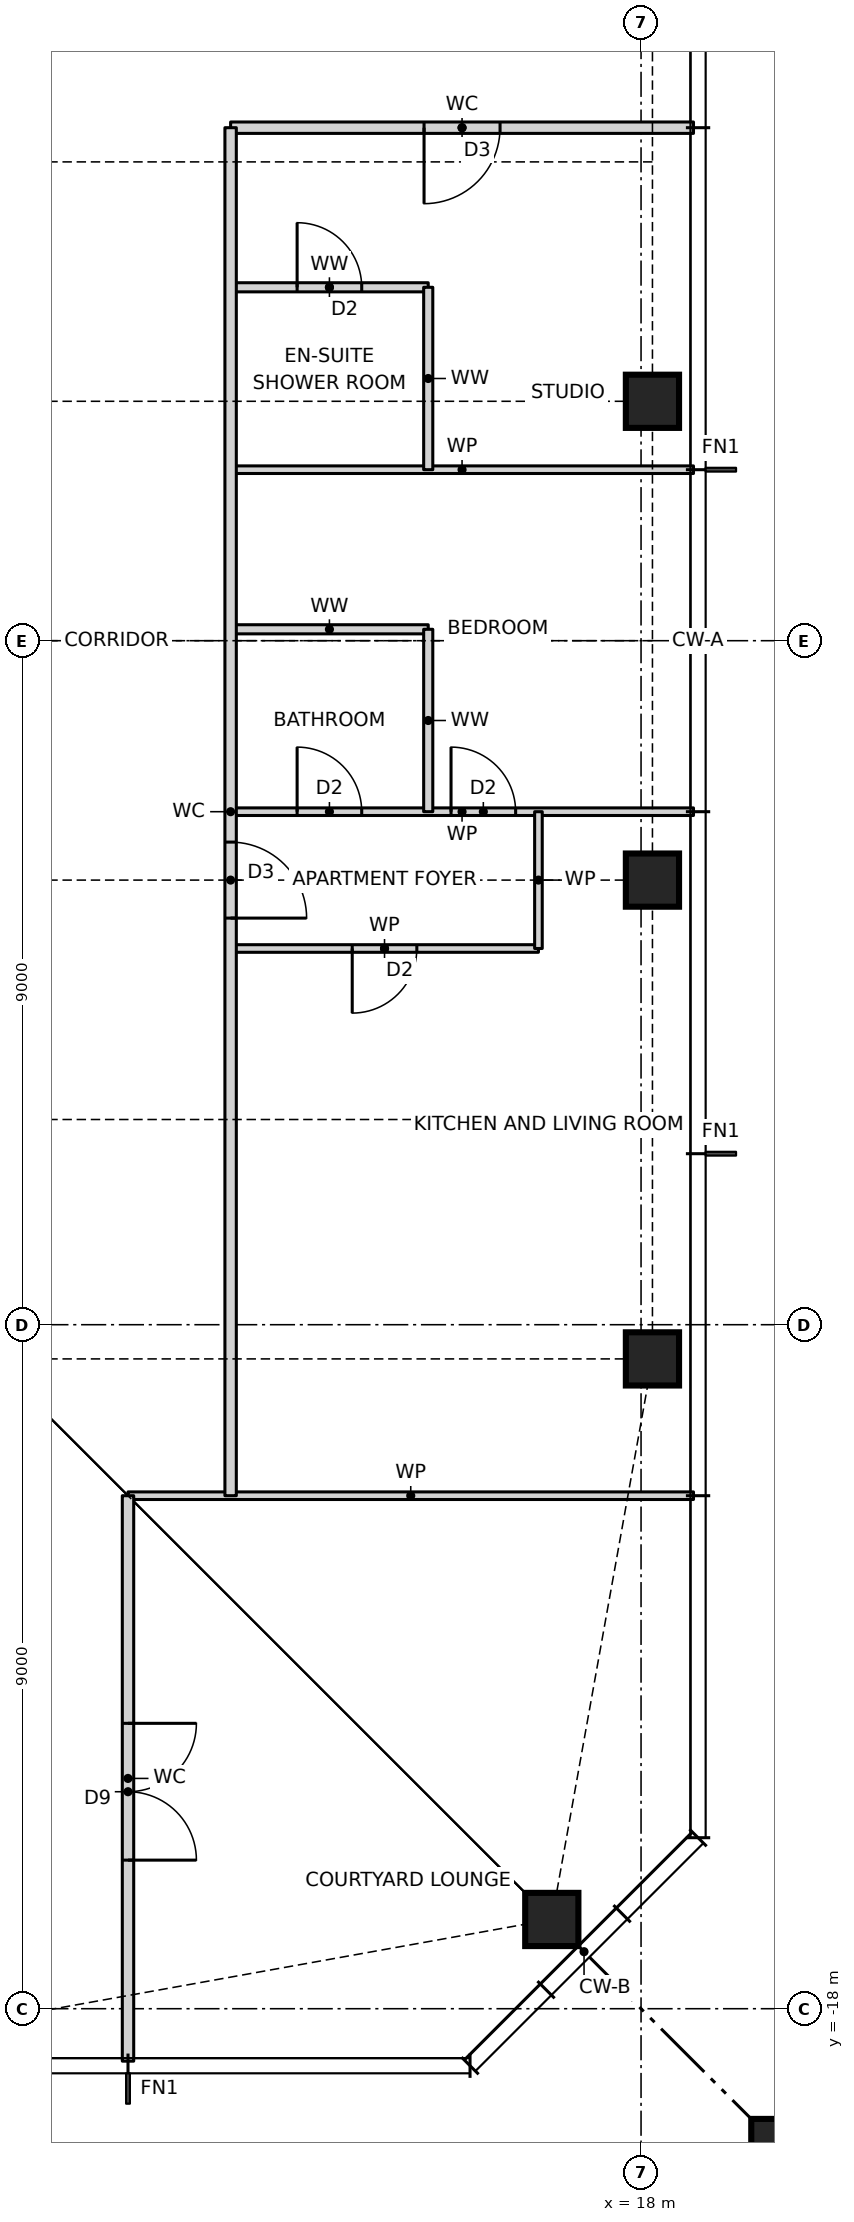
"""IFC4 building model, lengths in metres.
Left out: names, types, materials, properties, quantities, classifications, styles, units other than length and angle.
Written with IfcOpenShell. Run it as: python <this file> out.ifc"""

import sys

from ifc_helpers import new_model, si_unit, direction, frame, frame_2d, origin, origin_2d, place, context, subcontext, project, spatial, rectangle, hollow_rectangle, i_section, extrude, element, fill, save


model = new_model("IFC4")
c1 = context("Model", 3, precision=1e-05, world=origin(), true_north=direction((0.0, 1.0)))
c2 = subcontext(c1, "Body", "Model", "MODEL_VIEW")
j1 = project(units=[si_unit("LENGTHUNIT", "METRE"), si_unit("PLANEANGLEUNIT", "RADIAN")], contexts=[c1])
p1 = place(None, origin())
s1 = spatial("IfcSite", under=j1, at=p1, CompositionType="ELEMENT")
p2 = place(p1, origin())
s2 = spatial("IfcBuilding", under=s1, at=p2, CompositionType="ELEMENT")
p3 = place(p2, frame((0.0, 0.0, 170.5)))
s3 = spatial("IfcBuildingStorey", under=s2, at=p3, CompositionType="ELEMENT", Elevation=170.5)
for number, where, z_axis, x_axis in (
    (1, (16.826, -16.826, 0.0), (0.0, 0.0, 1.0), (1.0, 0.0, 0.0)),
    (2, (18.15, -9.45, 0.0), (0.0, 0.0, 1.0), (1.0, 0.0, 0.0)),
    (3, (18.15, -3.15, 0.0), (0.0, 0.0, 1.0), (1.0, 0.0, 0.0)),
    (4, (18.15, 3.15, 0.0), (0.0, 0.0, 1.0), (1.0, 0.0, 0.0)),
):
    element("IfcColumn", number, at=place(p3, frame(where, z_axis=z_axis, x_axis=x_axis)), inside=s3, PredefinedType="COLUMN", context=c2, shape_type="SweptSolid", body=[
        extrude(hollow_rectangle(XDim=0.7, YDim=0.7, WallThickness=0.06, at=origin_2d()), origin(), (0.0, 0.0, 1.0), 3.5),
    ])
p4 = place(p3, frame((21.65, -21.65, 0.0), z_axis=(0.0, 0.0, 1.0), x_axis=(1.0, 0.0, 0.0)))
e5 = element("IfcColumn", 5, at=p4, inside=s3, PredefinedType="COLUMN", context=c2, shape_type="SweptSolid", body=[
    extrude(rectangle(XDim=4.4, YDim=4.4, at=origin_2d()), origin(), (0.0, 0.0, 1.0), 3.5),
    extrude(i_section(OverallWidth=0.478, OverallDepth=0.599, WebThickness=0.1, FlangeThickness=0.14, at=origin_2d()), origin(), (0.0, 0.0, 1.0), 3.5),
])
p5 = place(p3, frame((11.25, -11.25, 0.0), z_axis=(0.0, 0.0, 1.0), x_axis=(1.0, 0.0, 0.0)))
e6 = element("IfcWall", 6, at=p5, inside=s3, PredefinedType="PARTITIONING", context=c2, shape_type="SweptSolid", body=[
    extrude(rectangle(XDim=7.44, YDim=0.1, at=frame_2d((3.72, 0.0))), origin(), (0.0, 0.0, 1.0), 3.27),
])
p6 = place(p3, frame((12.6, -4.05, 0.0), z_axis=(0.0, 0.0, 1.0), x_axis=(1.0, 0.0, 0.0)))
e7 = element("IfcWall", 7, at=p6, inside=s3, PredefinedType="PARTITIONING", context=c2, shape_type="SweptSolid", body=[
    extrude(rectangle(XDim=4.05, YDim=0.1, at=frame_2d((2.025, 0.0))), origin(), (0.0, 0.0, 1.0), 3.27),
])
p7 = place(p6, frame((1.6, 0.0, 0.0)))
e8 = element("IfcOpeningElement", 8, at=p7, cuts=e7, PredefinedType="OPENING", context=c2, shape_type="SweptSolid", body=[
    extrude(rectangle(XDim=0.85, YDim=2.1, at=frame_2d((0.425, 1.05))), frame((0.0, 0.06, 0.0), z_axis=(0.0, -1.0, 0.0), x_axis=(1.0, 0.0, 0.0)), (0.0, 0.0, 1.0), 0.12),
])
p8 = place(p3, frame((12.6, -2.25, 0.0), z_axis=(0.0, 0.0, 1.0), x_axis=(1.0, 0.0, 0.0)))
e9 = element("IfcWall", 9, at=p8, inside=s3, PredefinedType="PARTITIONING", context=c2, shape_type="SweptSolid", body=[
    extrude(rectangle(XDim=6.09, YDim=0.1, at=frame_2d((3.045, 0.0))), origin(), (0.0, 0.0, 1.0), 3.27),
])
p9 = place(p8, frame((2.9, 0.0, 0.0)))
e10 = element("IfcOpeningElement", 10, at=p9, cuts=e9, PredefinedType="OPENING", context=c2, shape_type="SweptSolid", body=[
    extrude(rectangle(XDim=0.85, YDim=2.1, at=frame_2d((0.425, 1.05))), frame((0.0, 0.06, 0.0), z_axis=(0.0, -1.0, 0.0), x_axis=(1.0, 0.0, 0.0)), (0.0, 0.0, 1.0), 0.12),
])
p10 = place(p8, frame((0.875, 0.0, 0.0)))
e11 = element("IfcOpeningElement", 11, at=p10, cuts=e9, PredefinedType="OPENING", context=c2, shape_type="SweptSolid", body=[
    extrude(rectangle(XDim=0.85, YDim=2.1, at=frame_2d((0.425, 1.05))), frame((0.0, 0.06, 0.0), z_axis=(0.0, -1.0, 0.0), x_axis=(1.0, 0.0, 0.0)), (0.0, 0.0, 1.0), 0.12),
])
p11 = place(p3, frame((12.6, 0.15, 0.0), z_axis=(0.0, 0.0, 1.0), x_axis=(1.0, 0.0, 0.0)))
e12 = element("IfcWall", 12, at=p11, inside=s3, PredefinedType="PARTITIONING", context=c2, shape_type="SweptSolid", body=[
    extrude(rectangle(XDim=2.6, YDim=0.12, at=frame_2d((1.3, 0.0))), origin(), (0.0, 0.0, 1.0), 3.27),
])
p12 = place(p3, frame((12.6, 2.25, 0.0), z_axis=(0.0, 0.0, 1.0), x_axis=(1.0, 0.0, 0.0)))
e13 = element("IfcWall", 13, at=p12, inside=s3, PredefinedType="PARTITIONING", context=c2, shape_type="SweptSolid", body=[
    extrude(rectangle(XDim=6.09, YDim=0.1, at=frame_2d((3.045, 0.0))), origin(), (0.0, 0.0, 1.0), 3.27),
])
p13 = place(p3, frame((12.6, 4.65, 0.0), z_axis=(0.0, 0.0, 1.0), x_axis=(1.0, 0.0, 0.0)))
e14 = element("IfcWall", 14, at=p13, inside=s3, PredefinedType="PARTITIONING", context=c2, shape_type="SweptSolid", body=[
    extrude(rectangle(XDim=2.6, YDim=0.12, at=frame_2d((1.3, 0.0))), origin(), (0.0, 0.0, 1.0), 3.27),
])
p14 = place(p13, frame((0.875, 0.0, 0.0)))
e15 = element("IfcOpeningElement", 15, at=p14, cuts=e14, PredefinedType="OPENING", context=c2, shape_type="SweptSolid", body=[
    extrude(rectangle(XDim=0.85, YDim=2.1, at=frame_2d((0.425, 1.05))), frame((0.0, 0.07, 0.0), z_axis=(0.0, -1.0, 0.0), x_axis=(1.0, 0.0, 0.0)), (0.0, 0.0, 1.0), 0.14),
])
p15 = place(p3, frame((12.6, 6.75, 0.0), z_axis=(0.0, 0.0, 1.0), x_axis=(1.0, 0.0, 0.0)))
e16 = element("IfcWall", 16, at=p15, inside=s3, PredefinedType="PARTITIONING", context=c2, shape_type="SweptSolid", body=[
    extrude(rectangle(XDim=6.09, YDim=0.15, at=frame_2d((3.045, 0.0))), origin(), (0.0, 0.0, 1.0), 3.27),
])
p16 = place(p15, frame((2.545, 0.0, 0.0)))
e17 = element("IfcOpeningElement", 17, at=p16, cuts=e16, PredefinedType="OPENING", context=c2, shape_type="SweptSolid", body=[
    extrude(rectangle(XDim=1.0, YDim=2.1, at=frame_2d((0.5, 1.05))), frame((0.0, 0.085, 0.0), z_axis=(0.0, -1.0, 0.0), x_axis=(1.0, 0.0, 0.0)), (0.0, 0.0, 1.0), 0.17),
])
p17 = place(p3, frame((16.65, -4.05, 0.0), z_axis=(0.0, 0.0, 1.0), x_axis=(0.0, 1.0, 0.0)))
e18 = element("IfcWall", 18, at=p17, inside=s3, PredefinedType="PARTITIONING", context=c2, shape_type="SweptSolid", body=[
    extrude(rectangle(XDim=1.8, YDim=0.1, at=frame_2d((0.9, 0.0))), origin(), (0.0, 0.0, 1.0), 3.27),
])
for number, where, z_axis, x_axis in (
    (19, (15.2, -2.25, 0.0), (0.0, 0.0, 1.0), (0.0, 1.0, 0.0)),
    (20, (15.2, 2.25, 0.0), (0.0, 0.0, 1.0), (0.0, 1.0, 0.0)),
):
    element("IfcWall", number, at=place(p3, frame(where, z_axis=z_axis, x_axis=x_axis)), inside=s3, PredefinedType="PARTITIONING", context=c2, shape_type="SweptSolid", body=[
        extrude(rectangle(XDim=2.4, YDim=0.12, at=frame_2d((1.2, 0.0))), origin(), (0.0, 0.0, 1.0), 3.27),
    ])
p18 = place(p3, frame((12.6, -11.25, 0.0), z_axis=(0.0, 0.0, 1.0), x_axis=(0.0, 1.0, 0.0)))
e21 = element("IfcWall", 21, at=p18, inside=s3, PredefinedType="PARTITIONING", context=c2, shape_type="SweptSolid", body=[
    extrude(rectangle(XDim=18.0, YDim=0.15, at=frame_2d((9.0, 0.0))), origin(), (0.0, 0.0, 1.0), 3.27),
])
p19 = place(p18, frame((7.6, 0.0, 0.0)))
e22 = element("IfcOpeningElement", 22, at=p19, cuts=e21, PredefinedType="OPENING", context=c2, shape_type="SweptSolid", body=[
    extrude(rectangle(XDim=1.0, YDim=2.1, at=frame_2d((0.5, 1.05))), frame((0.0, 0.085, 0.0), z_axis=(0.0, -1.0, 0.0), x_axis=(1.0, 0.0, 0.0)), (0.0, 0.0, 1.0), 0.17),
])
p20 = place(p3, frame((11.25, -18.69, 0.0), z_axis=(0.0, 0.0, 1.0), x_axis=(0.0, 1.0, 0.0)))
e23 = element("IfcWall", 23, at=p20, inside=s3, PredefinedType="PARTITIONING", context=c2, shape_type="SweptSolid", body=[
    extrude(rectangle(XDim=7.44, YDim=0.15, at=frame_2d((3.72, 0.0))), origin(), (0.0, 0.0, 1.0), 3.27),
])
p21 = place(p20, frame((2.645, 0.0, 0.0)))
e24 = element("IfcOpeningElement", 24, at=p21, cuts=e23, PredefinedType="OPENING", context=c2, shape_type="SweptSolid", body=[
    extrude(rectangle(XDim=1.8, YDim=2.1, at=frame_2d((0.9, 1.05))), frame((0.0, 0.085, 0.0), z_axis=(0.0, -1.0, 0.0), x_axis=(1.0, 0.0, 0.0)), (0.0, 0.0, 1.0), 0.17),
])
p22 = place(p19, frame((1.0, 0.0, 0.0), z_axis=(0.0, 0.0, 1.0), x_axis=(-1.0, 0.0, 0.0)))
e25 = element("IfcDoor", 25, at=p22, inside=s3, OperationType="SINGLE_SWING_RIGHT", PredefinedType="DOOR", context=c2, shape_type="SweptSolid", body=[
    extrude(rectangle(XDim=1.0, YDim=2.1, at=frame_2d((0.5, 1.05))), frame((0.0, 0.025, 0.0), z_axis=(0.0, -1.0, 0.0), x_axis=(1.0, 0.0, 0.0)), (0.0, 0.0, 1.0), 0.05),
])
fill(e22, e25)
p23 = place(p7, frame((0.85, 0.0, 0.0), z_axis=(0.0, 0.0, 1.0), x_axis=(-1.0, 0.0, 0.0)))
e26 = element("IfcDoor", 26, at=p23, inside=s3, OperationType="SINGLE_SWING_RIGHT", PredefinedType="DOOR", context=c2, shape_type="SweptSolid", body=[
    extrude(rectangle(XDim=0.85, YDim=2.1, at=frame_2d((0.425, 1.05))), frame((0.0, 0.025, 0.0), z_axis=(0.0, -1.0, 0.0), x_axis=(1.0, 0.0, 0.0)), (0.0, 0.0, 1.0), 0.05),
])
fill(e8, e26)
p24 = place(p9, origin())
e27 = element("IfcDoor", 27, at=p24, inside=s3, OperationType="SINGLE_SWING_LEFT", PredefinedType="DOOR", context=c2, shape_type="SweptSolid", body=[
    extrude(rectangle(XDim=0.85, YDim=2.1, at=frame_2d((0.425, 1.05))), frame((0.0, 0.025, 0.0), z_axis=(0.0, -1.0, 0.0), x_axis=(1.0, 0.0, 0.0)), (0.0, 0.0, 1.0), 0.05),
])
fill(e10, e27)
p25 = place(p10, origin())
e28 = element("IfcDoor", 28, at=p25, inside=s3, OperationType="SINGLE_SWING_LEFT", PredefinedType="DOOR", context=c2, shape_type="SweptSolid", body=[
    extrude(rectangle(XDim=0.85, YDim=2.1, at=frame_2d((0.425, 1.05))), frame((0.0, 0.025, 0.0), z_axis=(0.0, -1.0, 0.0), x_axis=(1.0, 0.0, 0.0)), (0.0, 0.0, 1.0), 0.05),
])
fill(e11, e28)
p26 = place(p16, frame((1.0, 0.0, 0.0), z_axis=(0.0, 0.0, 1.0), x_axis=(-1.0, 0.0, 0.0)))
e29 = element("IfcDoor", 29, at=p26, inside=s3, OperationType="SINGLE_SWING_RIGHT", PredefinedType="DOOR", context=c2, shape_type="SweptSolid", body=[
    extrude(rectangle(XDim=1.0, YDim=2.1, at=frame_2d((0.5, 1.05))), frame((0.0, 0.025, 0.0), z_axis=(0.0, -1.0, 0.0), x_axis=(1.0, 0.0, 0.0)), (0.0, 0.0, 1.0), 0.05),
])
fill(e17, e29)
p27 = place(p14, origin())
e30 = element("IfcDoor", 30, at=p27, inside=s3, OperationType="SINGLE_SWING_LEFT", PredefinedType="DOOR", context=c2, shape_type="SweptSolid", body=[
    extrude(rectangle(XDim=0.85, YDim=2.1, at=frame_2d((0.425, 1.05))), frame((0.0, 0.025, 0.0), z_axis=(0.0, -1.0, 0.0), x_axis=(1.0, 0.0, 0.0)), (0.0, 0.0, 1.0), 0.05),
])
fill(e15, e30)
p28 = place(p21, frame((1.8, 0.0, 0.0), z_axis=(0.0, 0.0, 1.0), x_axis=(-1.0, 0.0, 0.0)))
e31 = element("IfcDoor", 31, at=p28, inside=s3, OperationType="DOUBLE_DOOR_SINGLE_SWING", PredefinedType="DOOR", context=c2, shape_type="SweptSolid", body=[
    extrude(rectangle(XDim=1.8, YDim=2.1, at=frame_2d((0.9, 1.05))), frame((0.0, 0.025, 0.0), z_axis=(0.0, -1.0, 0.0), x_axis=(1.0, 0.0, 0.0)), (0.0, 0.0, 1.0), 0.05),
])
fill(e24, e31)
save(model, sys.argv[1])
